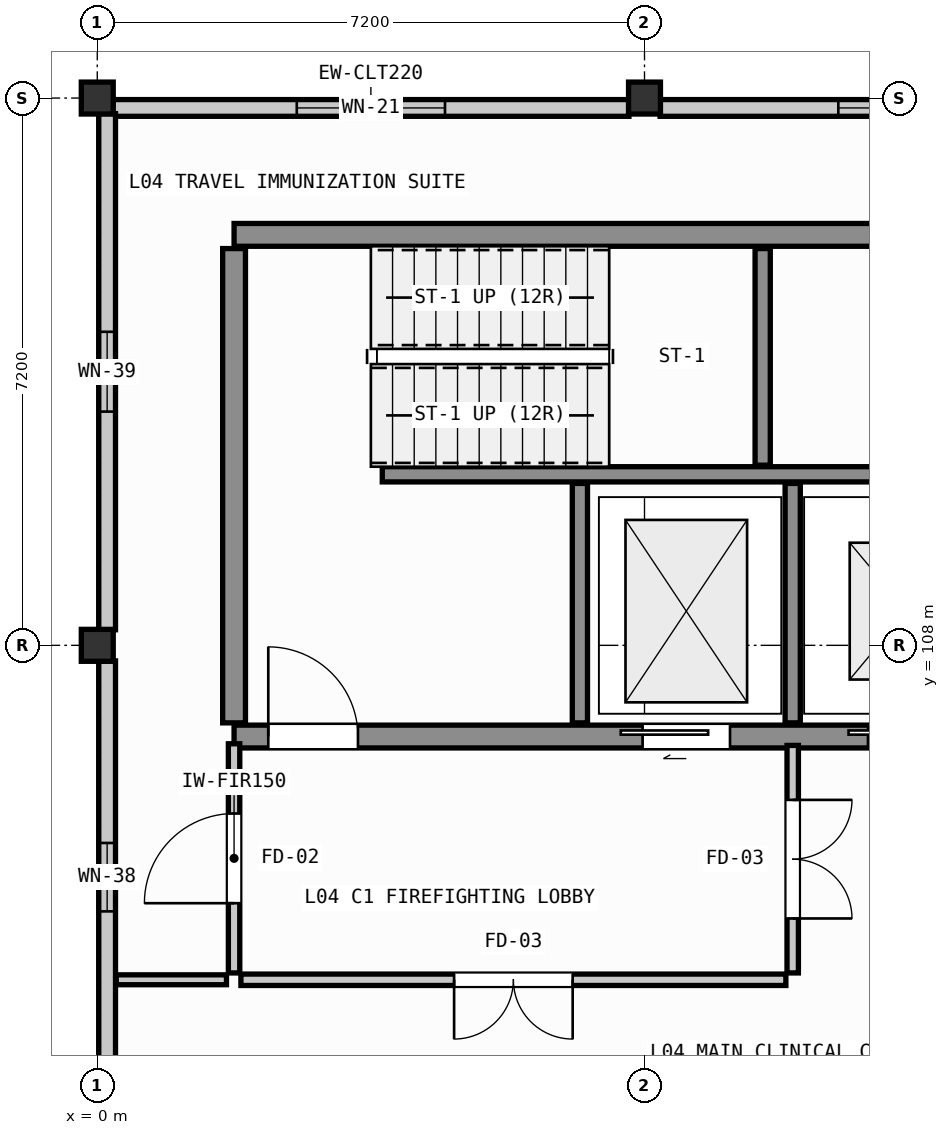
"""IFC4 building model, lengths in metres.
Left out: names, types, materials, properties, quantities, classifications, styles, units other than length and angle.
Written with IfcOpenShell. Run it as: python <this file> out.ifc"""

import sys

from ifc_helpers import new_model, si_unit, direction, frame, frame_2d, origin, origin_2d, place, context, subcontext, project, spatial, rectangle, extrude, element, fill, save


model = new_model("IFC4")
c1 = context("Model", 3, precision=1e-05, world=origin(), true_north=direction((0.0, 1.0)))
c2 = subcontext(c1, "Body", "Model", "MODEL_VIEW")
j1 = project(units=[si_unit("LENGTHUNIT", "METRE"), si_unit("PLANEANGLEUNIT", "RADIAN")], contexts=[c1])
p1 = place(None, origin())
s1 = spatial("IfcSite", under=j1, at=p1, CompositionType="ELEMENT")
p2 = place(p1, origin())
s2 = spatial("IfcBuilding", under=s1, at=p2, CompositionType="ELEMENT")
p3 = place(p2, frame((0.0, 0.0, 13.5)))
s3 = spatial("IfcBuildingStorey", under=s2, at=p3, CompositionType="ELEMENT", Elevation=13.5)
for number, where, z_axis, x_axis in (
    (1, (0.0, 108.0, 0.0), (0.0, 0.0, 1.0), (1.0, 0.0, 0.0)),
    (2, (0.0, 115.2, 0.0), (0.0, 0.0, 1.0), (1.0, 0.0, 0.0)),
    (3, (7.2, 115.2, 0.0), (0.0, 0.0, 1.0), (1.0, 0.0, 0.0)),
):
    element("IfcColumn", number, at=place(p3, frame(where, z_axis=z_axis, x_axis=x_axis)), inside=s3, PredefinedType="COLUMN", context=c2, shape_type="SweptSolid", body=[
        extrude(rectangle(XDim=0.42, YDim=0.42, at=origin_2d()), origin(), (0.0, 0.0, 1.0), 3.99),
    ])
p4 = place(p3, frame((0.205, 115.07, 0.0), z_axis=(0.0, 0.0, 1.0), x_axis=(1.0, 0.0, 0.0)))
e4 = element("IfcWall", 4, at=p4, inside=s3, PredefinedType="SOLIDWALL", context=c2, shape_type="SweptSolid", body=[
    extrude(rectangle(XDim=6.79, YDim=0.22, at=frame_2d((3.395, 0.0))), origin(), (0.0, 0.0, 1.0), 3.47),
])
p5 = place(p4, frame((2.42, 0.0, 1.5)))
e5 = element("IfcOpeningElement", 5, at=p5, cuts=e4, PredefinedType="OPENING", context=c2, shape_type="SweptSolid", body=[
    extrude(rectangle(XDim=1.95, YDim=0.95, at=frame_2d((0.975, 0.475))), frame((0.0, 0.12, 0.0), z_axis=(0.0, -1.0, 0.0), x_axis=(1.0, 0.0, 0.0)), (0.0, 0.0, 1.0), 0.24),
])
p6 = place(p3, frame((7.405, 115.07, 0.0), z_axis=(0.0, 0.0, 1.0), x_axis=(1.0, 0.0, 0.0)))
e6 = element("IfcWall", 6, at=p6, inside=s3, PredefinedType="SOLIDWALL", context=c2, shape_type="SweptSolid", body=[
    extrude(rectangle(XDim=6.79, YDim=0.22, at=frame_2d((3.395, 0.0))), origin(), (0.0, 0.0, 1.0), 3.35),
])
p7 = place(p6, frame((2.345, 0.0, 1.5)))
e7 = element("IfcOpeningElement", 7, at=p7, cuts=e6, PredefinedType="OPENING", context=c2, shape_type="SweptSolid", body=[
    extrude(rectangle(XDim=2.1, YDim=0.95, at=frame_2d((1.05, 0.475))), frame((0.0, 0.12, 0.0), z_axis=(0.0, -1.0, 0.0), x_axis=(1.0, 0.0, 0.0)), (0.0, 0.0, 1.0), 0.24),
])
p8 = place(p3, frame((0.13, 101.005, 0.0), z_axis=(0.0, 0.0, 1.0), x_axis=(0.0, 1.0, 0.0)))
e8 = element("IfcWall", 8, at=p8, inside=s3, PredefinedType="SOLIDWALL", context=c2, shape_type="SweptSolid", body=[
    extrude(rectangle(XDim=6.79, YDim=0.22, at=frame_2d((3.395, 0.0))), origin(), (0.0, 0.0, 1.0), 3.27),
])
p9 = place(p8, frame((3.495, 0.0, 0.95)))
e9 = element("IfcOpeningElement", 9, at=p9, cuts=e8, PredefinedType="OPENING", context=c2, shape_type="SweptSolid", body=[
    extrude(rectangle(XDim=0.9, YDim=1.55, at=frame_2d((0.45, 0.775))), frame((0.0, 0.12, 0.0), z_axis=(0.0, -1.0, 0.0), x_axis=(1.0, 0.0, 0.0)), (0.0, 0.0, 1.0), 0.24),
])
p10 = place(p3, frame((0.13, 108.205, 0.0), z_axis=(0.0, 0.0, 1.0), x_axis=(0.0, 1.0, 0.0)))
e10 = element("IfcWall", 10, at=p10, inside=s3, PredefinedType="SOLIDWALL", context=c2, shape_type="SweptSolid", body=[
    extrude(rectangle(XDim=6.79, YDim=0.22, at=frame_2d((3.395, 0.0))), origin(), (0.0, 0.0, 1.0), 3.47),
])
p11 = place(p10, frame((2.87, 0.0, 0.95)))
e11 = element("IfcOpeningElement", 11, at=p11, cuts=e10, PredefinedType="OPENING", context=c2, shape_type="SweptSolid", body=[
    extrude(rectangle(XDim=1.05, YDim=1.55, at=frame_2d((0.525, 0.775))), frame((0.0, 0.12, 0.0), z_axis=(0.0, -1.0, 0.0), x_axis=(1.0, 0.0, 0.0)), (0.0, 0.0, 1.0), 0.24),
])
p12 = place(p3, frame((1.8, 106.8, 0.0), z_axis=(0.0, 0.0, 1.0), x_axis=(1.0, 0.0, 0.0)))
e12 = element("IfcWall", 12, at=p12, inside=s3, PredefinedType="SHEAR", context=c2, shape_type="SweptSolid", body=[
    extrude(rectangle(XDim=10.8, YDim=0.3, at=frame_2d((5.4, 0.0))), origin(), (0.0, 0.0, 1.0), 4.2),
])
p13 = place(p12, frame((0.45, 0.0, 0.0)))
e13 = element("IfcOpeningElement", 13, at=p13, cuts=e12, PredefinedType="OPENING", context=c2, shape_type="SweptSolid", body=[
    extrude(rectangle(XDim=1.18, YDim=2.16, at=frame_2d((0.59, 1.08))), frame((0.0, 0.16, 0.0), z_axis=(0.0, -1.0, 0.0), x_axis=(1.0, 0.0, 0.0)), (0.0, 0.0, 1.0), 0.32),
])
p14 = place(p12, frame((5.375, 0.0, 0.0)))
e14 = element("IfcOpeningElement", 14, at=p14, cuts=e12, PredefinedType="OPENING", context=c2, shape_type="SweptSolid", body=[
    extrude(rectangle(XDim=1.15, YDim=2.15, at=frame_2d((0.575, 1.075))), frame((0.0, 0.16, 0.0), z_axis=(0.0, -1.0, 0.0), x_axis=(1.0, 0.0, 0.0)), (0.0, 0.0, 1.0), 0.32),
])
p15 = place(p12, frame((8.34, 0.0, 0.0)))
e15 = element("IfcOpeningElement", 15, at=p15, cuts=e12, PredefinedType="OPENING", context=c2, shape_type="SweptSolid", body=[
    extrude(rectangle(XDim=1.02, YDim=2.12, at=frame_2d((0.51, 1.06))), frame((0.0, 0.16, 0.0), z_axis=(0.0, -1.0, 0.0), x_axis=(1.0, 0.0, 0.0)), (0.0, 0.0, 1.0), 0.32),
])
p16 = place(p3, frame((1.8, 113.4, 0.0), z_axis=(0.0, 0.0, 1.0), x_axis=(1.0, 0.0, 0.0)))
e16 = element("IfcWall", 16, at=p16, inside=s3, PredefinedType="SHEAR", context=c2, shape_type="SweptSolid", body=[
    extrude(rectangle(XDim=10.8, YDim=0.3, at=frame_2d((5.4, 0.0))), origin(), (0.0, 0.0, 1.0), 4.2),
])
p17 = place(p3, frame((1.8, 106.98, 0.0), z_axis=(0.0, 0.0, 1.0), x_axis=(0.0, 1.0, 0.0)))
e17 = element("IfcWall", 17, at=p17, inside=s3, PredefinedType="SHEAR", context=c2, shape_type="SweptSolid", body=[
    extrude(rectangle(XDim=6.24, YDim=0.3, at=frame_2d((3.12, 0.0))), origin(), (0.0, 0.0, 1.0), 4.2),
])
p18 = place(p3, frame((3.75, 110.25, 0.0), z_axis=(0.0, 0.0, 1.0), x_axis=(1.0, 0.0, 0.0)))
e18 = element("IfcWall", 18, at=p18, inside=s3, PredefinedType="SHEAR", context=c2, shape_type="SweptSolid", body=[
    extrude(rectangle(XDim=8.67, YDim=0.2, at=frame_2d((4.335, 0.0))), origin(), (0.0, 0.0, 1.0), 4.2),
])
p19 = place(p3, frame((8.755, 110.37, 0.0), z_axis=(0.0, 0.0, 1.0), x_axis=(0.0, 1.0, 0.0)))
e19 = element("IfcWall", 19, at=p19, inside=s3, PredefinedType="SHEAR", context=c2, shape_type="SweptSolid", body=[
    extrude(rectangle(XDim=2.85, YDim=0.2, at=frame_2d((1.425, 0.0))), origin(), (0.0, 0.0, 1.0), 4.2),
])
for number, where, z_axis, x_axis in (
    (20, (6.35, 106.98, 0.0), (0.0, 0.0, 1.0), (0.0, 1.0, 0.0)),
    (21, (9.15, 106.98, 0.0), (0.0, 0.0, 1.0), (0.0, 1.0, 0.0)),
):
    element("IfcWall", number, at=place(p3, frame(where, z_axis=z_axis, x_axis=x_axis)), inside=s3, PredefinedType="SHEAR", context=c2, shape_type="SweptSolid", body=[
        extrude(rectangle(XDim=3.15, YDim=0.2, at=frame_2d((1.575, 0.0))), origin(), (0.0, 0.0, 1.0), 4.2),
    ])
p20 = place(p3, frame((1.8, 103.69, 0.0), z_axis=(0.0, 0.0, 1.0), x_axis=(0.0, 1.0, 0.0)))
e22 = element("IfcWall", 22, at=p20, inside=s3, PredefinedType="PARTITIONING", context=c2, shape_type="SweptSolid", body=[
    extrude(rectangle(XDim=3.015, YDim=0.15, at=frame_2d((1.508, 0.0))), origin(), (0.0, 0.0, 1.0), 3.97),
])
p21 = place(p20, frame((0.917, 0.0, 0.0)))
e23 = element("IfcOpeningElement", 23, at=p21, cuts=e22, PredefinedType="OPENING", context=c2, shape_type="SweptSolid", body=[
    extrude(rectangle(XDim=1.18, YDim=2.16, at=frame_2d((0.59, 1.08))), frame((0.0, 0.085, 0.0), z_axis=(0.0, -1.0, 0.0), x_axis=(1.0, 0.0, 0.0)), (0.0, 0.0, 1.0), 0.17),
])
p22 = place(p3, frame((9.15, 106.683, 0.0), z_axis=(0.0, 0.0, 1.0), x_axis=(0.0, -1.0, 0.0)))
e24 = element("IfcWall", 24, at=p22, inside=s3, PredefinedType="PARTITIONING", context=c2, shape_type="SweptSolid", body=[
    extrude(rectangle(XDim=2.993, YDim=0.15, at=frame_2d((1.497, 0.0))), origin(), (0.0, 0.0, 1.0), 3.97),
])
p23 = place(p22, frame((0.717, 0.0, 0.0)))
e25 = element("IfcOpeningElement", 25, at=p23, cuts=e24, PredefinedType="OPENING", context=c2, shape_type="SweptSolid", body=[
    extrude(rectangle(XDim=1.56, YDim=2.22, at=frame_2d((0.78, 1.11))), frame((0.0, 0.085, 0.0), z_axis=(0.0, -1.0, 0.0), x_axis=(1.0, 0.0, 0.0)), (0.0, 0.0, 1.0), 0.17),
])
p24 = place(p3, frame((9.06, 103.6, 0.0), z_axis=(0.0, 0.0, 1.0), x_axis=(-1.0, 0.0, 0.0)))
e26 = element("IfcWall", 26, at=p24, inside=s3, PredefinedType="PARTITIONING", context=c2, shape_type="SweptSolid", body=[
    extrude(rectangle(XDim=7.17, YDim=0.15, at=frame_2d((3.585, 0.0))), origin(), (0.0, 0.0, 1.0), 3.97),
])
p25 = place(p24, frame((2.805, 0.0, 0.0)))
e27 = element("IfcOpeningElement", 27, at=p25, cuts=e26, PredefinedType="OPENING", context=c2, shape_type="SweptSolid", body=[
    extrude(rectangle(XDim=1.56, YDim=2.22, at=frame_2d((0.78, 1.11))), frame((0.0, 0.085, 0.0), z_axis=(0.0, -1.0, 0.0), x_axis=(1.0, 0.0, 0.0)), (0.0, 0.0, 1.0), 0.17),
])
p26 = place(p3, frame((1.7, 103.6, 0.0), z_axis=(0.0, 0.0, 1.0), x_axis=(-1.0, 0.0, 0.0)))
e28 = element("IfcWall", 28, at=p26, inside=s3, PredefinedType="PARTITIONING", context=c2, shape_type="SweptSolid", body=[
    extrude(rectangle(XDim=1.45, YDim=0.13, at=frame_2d((0.725, 0.0))), origin(), (0.0, 0.0, 1.0), 3.47),
])
p27 = place(p5, origin())
e29 = element("IfcWindow", 29, at=p27, inside=s3, PartitioningType="SINGLE_PANEL", PredefinedType="WINDOW", context=c2, shape_type="SweptSolid", body=[
    extrude(rectangle(XDim=1.95, YDim=0.95, at=frame_2d((0.975, 0.475))), frame((0.0, 0.03, 0.0), z_axis=(0.0, -1.0, 0.0), x_axis=(1.0, 0.0, 0.0)), (0.0, 0.0, 1.0), 0.06),
])
fill(e5, e29)
p28 = place(p7, origin())
e30 = element("IfcWindow", 30, at=p28, inside=s3, PartitioningType="SINGLE_PANEL", PredefinedType="WINDOW", context=c2, shape_type="SweptSolid", body=[
    extrude(rectangle(XDim=2.1, YDim=0.95, at=frame_2d((1.05, 0.475))), frame((0.0, 0.03, 0.0), z_axis=(0.0, -1.0, 0.0), x_axis=(1.0, 0.0, 0.0)), (0.0, 0.0, 1.0), 0.06),
])
fill(e7, e30)
p29 = place(p9, origin())
e31 = element("IfcWindow", 31, at=p29, inside=s3, PartitioningType="SINGLE_PANEL", PredefinedType="WINDOW", context=c2, shape_type="SweptSolid", body=[
    extrude(rectangle(XDim=0.9, YDim=1.55, at=frame_2d((0.45, 0.775))), frame((0.0, 0.03, 0.0), z_axis=(0.0, -1.0, 0.0), x_axis=(1.0, 0.0, 0.0)), (0.0, 0.0, 1.0), 0.06),
])
fill(e9, e31)
p30 = place(p11, origin())
e32 = element("IfcWindow", 32, at=p30, inside=s3, PartitioningType="SINGLE_PANEL", PredefinedType="WINDOW", context=c2, shape_type="SweptSolid", body=[
    extrude(rectangle(XDim=1.05, YDim=1.55, at=frame_2d((0.525, 0.775))), frame((0.0, 0.03, 0.0), z_axis=(0.0, -1.0, 0.0), x_axis=(1.0, 0.0, 0.0)), (0.0, 0.0, 1.0), 0.06),
])
fill(e11, e32)
p31 = place(p13, origin())
e33 = element("IfcDoor", 33, at=p31, inside=s3, OperationType="SINGLE_SWING_LEFT", PredefinedType="DOOR", context=c2, shape_type="SweptSolid", body=[
    extrude(rectangle(XDim=1.18, YDim=2.16, at=frame_2d((0.59, 1.08))), frame((0.0, 0.025, 0.0), z_axis=(0.0, -1.0, 0.0), x_axis=(1.0, 0.0, 0.0)), (0.0, 0.0, 1.0), 0.05),
])
fill(e13, e33)
p32 = place(p14, origin())
e34 = element("IfcDoor", 34, at=p32, inside=s3, OperationType="DOUBLE_DOOR_SLIDING", PredefinedType="DOOR", context=c2, shape_type="SweptSolid", body=[
    extrude(rectangle(XDim=1.15, YDim=2.15, at=frame_2d((0.575, 1.075))), frame((0.0, 0.025, 0.0), z_axis=(0.0, -1.0, 0.0), x_axis=(1.0, 0.0, 0.0)), (0.0, 0.0, 1.0), 0.05),
])
fill(e14, e34)
p33 = place(p15, origin())
e35 = element("IfcDoor", 35, at=p33, inside=s3, OperationType="SLIDING_TO_LEFT", PredefinedType="DOOR", context=c2, shape_type="SweptSolid", body=[
    extrude(rectangle(XDim=1.02, YDim=2.12, at=frame_2d((0.51, 1.06))), frame((0.0, 0.025, 0.0), z_axis=(0.0, -1.0, 0.0), x_axis=(1.0, 0.0, 0.0)), (0.0, 0.0, 1.0), 0.05),
])
fill(e15, e35)
p34 = place(p23, origin())
e36 = element("IfcDoor", 36, at=p34, inside=s3, OperationType="DOUBLE_DOOR_SINGLE_SWING", PredefinedType="DOOR", context=c2, shape_type="SweptSolid", body=[
    extrude(rectangle(XDim=1.56, YDim=2.22, at=frame_2d((0.78, 1.11))), frame((0.0, 0.025, 0.0), z_axis=(0.0, -1.0, 0.0), x_axis=(1.0, 0.0, 0.0)), (0.0, 0.0, 1.0), 0.05),
])
fill(e25, e36)
p35 = place(p25, origin())
e37 = element("IfcDoor", 37, at=p35, inside=s3, OperationType="DOUBLE_DOOR_SINGLE_SWING", PredefinedType="DOOR", context=c2, shape_type="SweptSolid", body=[
    extrude(rectangle(XDim=1.56, YDim=2.22, at=frame_2d((0.78, 1.11))), frame((0.0, 0.025, 0.0), z_axis=(0.0, -1.0, 0.0), x_axis=(1.0, 0.0, 0.0)), (0.0, 0.0, 1.0), 0.05),
])
fill(e27, e37)
p36 = place(p21, origin())
e38 = element("IfcDoor", 38, at=p36, inside=s3, OperationType="SINGLE_SWING_RIGHT", PredefinedType="DOOR", context=c2, shape_type="SweptSolid", body=[
    extrude(rectangle(XDim=1.18, YDim=2.16, at=frame_2d((0.59, 1.08))), frame((0.0, 0.025, 0.0), z_axis=(0.0, -1.0, 0.0), x_axis=(1.0, 0.0, 0.0)), (0.0, 0.0, 1.0), 0.05),
])
fill(e23, e38)
save(model, sys.argv[1])
